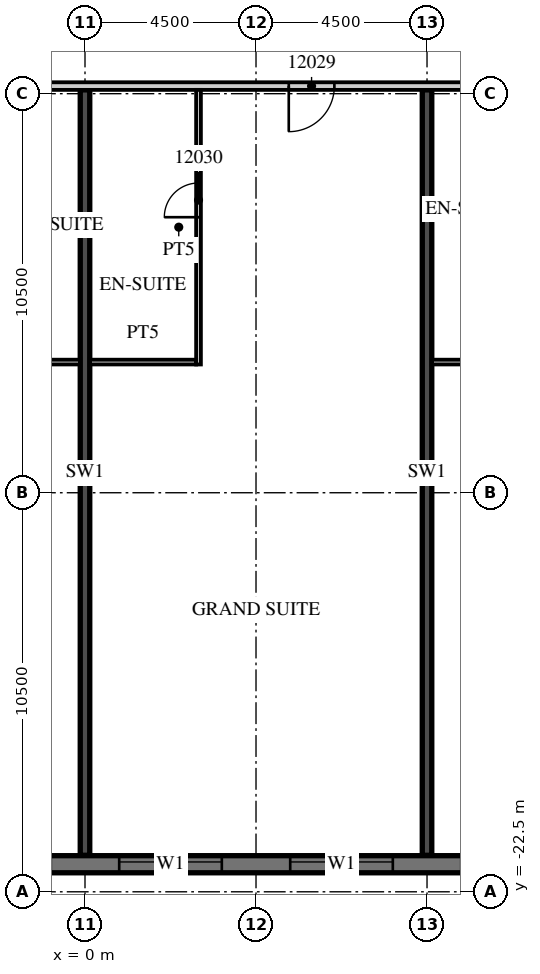
"""IFC4 building model, lengths in metres.
Left out: names, types, materials, properties, quantities, classifications, styles, units other than length and angle.
Written with IfcOpenShell. Run it as: python <this file> out.ifc"""

import sys

from ifc_helpers import new_model, si_unit, direction, frame, frame_2d, origin, place, context, subcontext, project, spatial, rectangle, extrude, element, fill, save


model = new_model("IFC4")
c1 = context("Model", 3, precision=1e-05, world=origin(), true_north=direction((0.0, 1.0)))
c2 = subcontext(c1, "Body", "Model", "MODEL_VIEW")
j1 = project(units=[si_unit("LENGTHUNIT", "METRE"), si_unit("PLANEANGLEUNIT", "RADIAN")], contexts=[c1])
p1 = place(None, origin())
s1 = spatial("IfcSite", under=j1, at=p1, CompositionType="ELEMENT")
p2 = place(p1, origin())
s2 = spatial("IfcBuilding", under=s1, at=p2, CompositionType="ELEMENT")
p3 = place(p2, frame((0.0, 0.0, 69.9)))
s3 = spatial("IfcBuildingStorey", under=s2, at=p3, CompositionType="ELEMENT", Elevation=69.9)
for number, where, z_axis, x_axis in (
    (1, (0.0, -21.54, 0.0), (0.0, 0.0, 1.0), (0.0, 1.0, 0.0)),
    (2, (9.0, -21.54, 0.0), (0.0, 0.0, 1.0), (0.0, 1.0, 0.0)),
):
    element("IfcWall", number, at=place(p3, frame(where, z_axis=z_axis, x_axis=x_axis)), inside=s3, PredefinedType="SHEAR", context=c2, shape_type="SweptSolid", body=[
        extrude(rectangle(XDim=20.14, YDim=0.25, at=frame_2d((10.07, 0.0))), origin(), (0.0, 0.0, 1.0), 3.3),
    ])
p4 = place(p3, frame((-13.5, -21.775, 0.0), z_axis=(0.0, 0.0, 1.0), x_axis=(1.0, 0.0, 0.0)))
e3 = element("IfcWall", 3, at=p4, inside=s3, PredefinedType="SOLIDWALL", context=c2, shape_type="SweptSolid", body=[
    extrude(rectangle(XDim=54.5, YDim=0.45, at=frame_2d((27.25, 0.0))), origin(), (0.0, 0.0, 1.0), 3.02),
])
p5 = place(p4, frame((0.9, 0.0, 0.45)))
e4 = element("IfcOpeningElement", 4, at=p5, cuts=e3, PredefinedType="OPENING", context=c2, shape_type="SweptSolid", body=[
    extrude(rectangle(XDim=2.7, YDim=2.25, at=frame_2d((1.35, 1.125))), frame((0.0, 0.235, 0.0), z_axis=(0.0, -1.0, 0.0), x_axis=(1.0, 0.0, 0.0)), (0.0, 0.0, 1.0), 0.47),
])
p6 = place(p4, frame((5.4, 0.0, 0.45)))
e5 = element("IfcOpeningElement", 5, at=p6, cuts=e3, PredefinedType="OPENING", context=c2, shape_type="SweptSolid", body=[
    extrude(rectangle(XDim=2.7, YDim=2.25, at=frame_2d((1.35, 1.125))), frame((0.0, 0.235, 0.0), z_axis=(0.0, -1.0, 0.0), x_axis=(1.0, 0.0, 0.0)), (0.0, 0.0, 1.0), 0.47),
])
p7 = place(p4, frame((9.9, 0.0, 0.45)))
e6 = element("IfcOpeningElement", 6, at=p7, cuts=e3, PredefinedType="OPENING", context=c2, shape_type="SweptSolid", body=[
    extrude(rectangle(XDim=2.7, YDim=2.25, at=frame_2d((1.35, 1.125))), frame((0.0, 0.235, 0.0), z_axis=(0.0, -1.0, 0.0), x_axis=(1.0, 0.0, 0.0)), (0.0, 0.0, 1.0), 0.47),
])
p8 = place(p4, frame((14.4, 0.0, 0.45)))
e7 = element("IfcOpeningElement", 7, at=p8, cuts=e3, PredefinedType="OPENING", context=c2, shape_type="SweptSolid", body=[
    extrude(rectangle(XDim=2.7, YDim=2.25, at=frame_2d((1.35, 1.125))), frame((0.0, 0.235, 0.0), z_axis=(0.0, -1.0, 0.0), x_axis=(1.0, 0.0, 0.0)), (0.0, 0.0, 1.0), 0.47),
])
p9 = place(p4, frame((18.9, 0.0, 0.45)))
e8 = element("IfcOpeningElement", 8, at=p9, cuts=e3, PredefinedType="OPENING", context=c2, shape_type="SweptSolid", body=[
    extrude(rectangle(XDim=2.7, YDim=2.25, at=frame_2d((1.35, 1.125))), frame((0.0, 0.235, 0.0), z_axis=(0.0, -1.0, 0.0), x_axis=(1.0, 0.0, 0.0)), (0.0, 0.0, 1.0), 0.47),
])
p10 = place(p4, frame((23.4, 0.0, 0.45)))
e9 = element("IfcOpeningElement", 9, at=p10, cuts=e3, PredefinedType="OPENING", context=c2, shape_type="SweptSolid", body=[
    extrude(rectangle(XDim=2.7, YDim=2.25, at=frame_2d((1.35, 1.125))), frame((0.0, 0.235, 0.0), z_axis=(0.0, -1.0, 0.0), x_axis=(1.0, 0.0, 0.0)), (0.0, 0.0, 1.0), 0.47),
])
p11 = place(p4, frame((27.9, 0.0, 0.45)))
e10 = element("IfcOpeningElement", 10, at=p11, cuts=e3, PredefinedType="OPENING", context=c2, shape_type="SweptSolid", body=[
    extrude(rectangle(XDim=2.7, YDim=2.25, at=frame_2d((1.35, 1.125))), frame((0.0, 0.235, 0.0), z_axis=(0.0, -1.0, 0.0), x_axis=(1.0, 0.0, 0.0)), (0.0, 0.0, 1.0), 0.47),
])
p12 = place(p4, frame((32.4, 0.0, 0.45)))
e11 = element("IfcOpeningElement", 11, at=p12, cuts=e3, PredefinedType="OPENING", context=c2, shape_type="SweptSolid", body=[
    extrude(rectangle(XDim=2.7, YDim=2.25, at=frame_2d((1.35, 1.125))), frame((0.0, 0.235, 0.0), z_axis=(0.0, -1.0, 0.0), x_axis=(1.0, 0.0, 0.0)), (0.0, 0.0, 1.0), 0.47),
])
p13 = place(p4, frame((36.9, 0.0, 0.45)))
e12 = element("IfcOpeningElement", 12, at=p13, cuts=e3, PredefinedType="OPENING", context=c2, shape_type="SweptSolid", body=[
    extrude(rectangle(XDim=2.7, YDim=2.25, at=frame_2d((1.35, 1.125))), frame((0.0, 0.235, 0.0), z_axis=(0.0, -1.0, 0.0), x_axis=(1.0, 0.0, 0.0)), (0.0, 0.0, 1.0), 0.47),
])
p14 = place(p4, frame((41.4, 0.0, 0.45)))
e13 = element("IfcOpeningElement", 13, at=p14, cuts=e3, PredefinedType="OPENING", context=c2, shape_type="SweptSolid", body=[
    extrude(rectangle(XDim=2.7, YDim=2.25, at=frame_2d((1.35, 1.125))), frame((0.0, 0.235, 0.0), z_axis=(0.0, -1.0, 0.0), x_axis=(1.0, 0.0, 0.0)), (0.0, 0.0, 1.0), 0.47),
])
p15 = place(p4, frame((45.9, 0.0, 0.45)))
e14 = element("IfcOpeningElement", 14, at=p15, cuts=e3, PredefinedType="OPENING", context=c2, shape_type="SweptSolid", body=[
    extrude(rectangle(XDim=2.7, YDim=2.25, at=frame_2d((1.35, 1.125))), frame((0.0, 0.235, 0.0), z_axis=(0.0, -1.0, 0.0), x_axis=(1.0, 0.0, 0.0)), (0.0, 0.0, 1.0), 0.47),
])
p16 = place(p4, frame((50.4, 0.0, 0.45)))
e15 = element("IfcOpeningElement", 15, at=p16, cuts=e3, PredefinedType="OPENING", context=c2, shape_type="SweptSolid", body=[
    extrude(rectangle(XDim=2.7, YDim=2.25, at=frame_2d((1.35, 1.125))), frame((0.0, 0.235, 0.0), z_axis=(0.0, -1.0, 0.0), x_axis=(1.0, 0.0, 0.0)), (0.0, 0.0, 1.0), 0.47),
])
p17 = place(p3, frame((-13.5, -1.3, 0.0), z_axis=(0.0, 0.0, 1.0), x_axis=(1.0, 0.0, 0.0)))
e16 = element("IfcWall", 16, at=p17, inside=s3, PredefinedType="PARTITIONING", context=c2, shape_type="SweptSolid", body=[
    extrude(rectangle(XDim=58.05, YDim=0.2, at=frame_2d((29.025, 0.0))), origin(), (0.0, 0.0, 1.0), 3.02),
])
p18 = place(p17, frame((2.925, 0.0, 0.0)))
e17 = element("IfcOpeningElement", 17, at=p18, cuts=e16, PredefinedType="OPENING", context=c2, shape_type="SweptSolid", body=[
    extrude(rectangle(XDim=1.0, YDim=2.1, at=frame_2d((0.5, 1.05))), frame((0.0, 0.11, 0.0), z_axis=(0.0, -1.0, 0.0), x_axis=(1.0, 0.0, 0.0)), (0.0, 0.0, 1.0), 0.22),
])
p19 = place(p17, frame((5.075, 0.0, 0.0)))
e18 = element("IfcOpeningElement", 18, at=p19, cuts=e16, PredefinedType="OPENING", context=c2, shape_type="SweptSolid", body=[
    extrude(rectangle(XDim=1.0, YDim=2.1, at=frame_2d((0.5, 1.05))), frame((0.0, 0.11, 0.0), z_axis=(0.0, -1.0, 0.0), x_axis=(1.0, 0.0, 0.0)), (0.0, 0.0, 1.0), 0.22),
])
p20 = place(p17, frame((9.55, 0.0, 0.0)))
e19 = element("IfcOpeningElement", 19, at=p20, cuts=e16, PredefinedType="OPENING", context=c2, shape_type="SweptSolid", body=[
    extrude(rectangle(XDim=1.0, YDim=2.1, at=frame_2d((0.5, 1.05))), frame((0.0, 0.11, 0.0), z_axis=(0.0, -1.0, 0.0), x_axis=(1.0, 0.0, 0.0)), (0.0, 0.0, 1.0), 0.22),
])
p21 = place(p17, frame((18.862, 0.0, 0.0)))
e20 = element("IfcOpeningElement", 20, at=p21, cuts=e16, PredefinedType="OPENING", context=c2, shape_type="SweptSolid", body=[
    extrude(rectangle(XDim=1.2, YDim=2.1, at=frame_2d((0.6, 1.05))), frame((0.0, 0.11, 0.0), z_axis=(0.0, -1.0, 0.0), x_axis=(1.0, 0.0, 0.0)), (0.0, 0.0, 1.0), 0.22),
])
p22 = place(p17, frame((27.862, 0.0, 0.0)))
e21 = element("IfcOpeningElement", 21, at=p22, cuts=e16, PredefinedType="OPENING", context=c2, shape_type="SweptSolid", body=[
    extrude(rectangle(XDim=1.2, YDim=2.1, at=frame_2d((0.6, 1.05))), frame((0.0, 0.11, 0.0), z_axis=(0.0, -1.0, 0.0), x_axis=(1.0, 0.0, 0.0)), (0.0, 0.0, 1.0), 0.22),
])
p23 = place(p17, frame((34.45, 0.0, 0.0)))
e22 = element("IfcOpeningElement", 22, at=p23, cuts=e16, PredefinedType="OPENING", context=c2, shape_type="SweptSolid", body=[
    extrude(rectangle(XDim=1.0, YDim=2.1, at=frame_2d((0.5, 1.05))), frame((0.0, 0.11, 0.0), z_axis=(0.0, -1.0, 0.0), x_axis=(1.0, 0.0, 0.0)), (0.0, 0.0, 1.0), 0.22),
])
p24 = place(p17, frame((38.925, 0.0, 0.0)))
e23 = element("IfcOpeningElement", 23, at=p24, cuts=e16, PredefinedType="OPENING", context=c2, shape_type="SweptSolid", body=[
    extrude(rectangle(XDim=1.0, YDim=2.1, at=frame_2d((0.5, 1.05))), frame((0.0, 0.11, 0.0), z_axis=(0.0, -1.0, 0.0), x_axis=(1.0, 0.0, 0.0)), (0.0, 0.0, 1.0), 0.22),
])
p25 = place(p17, frame((45.862, 0.0, 0.0)))
e24 = element("IfcOpeningElement", 24, at=p25, cuts=e16, PredefinedType="OPENING", context=c2, shape_type="SweptSolid", body=[
    extrude(rectangle(XDim=1.2, YDim=2.1, at=frame_2d((0.6, 1.05))), frame((0.0, 0.11, 0.0), z_axis=(0.0, -1.0, 0.0), x_axis=(1.0, 0.0, 0.0)), (0.0, 0.0, 1.0), 0.22),
])
p26 = place(p17, frame((50.075, 0.0, 0.0)))
e25 = element("IfcOpeningElement", 25, at=p26, cuts=e16, PredefinedType="OPENING", context=c2, shape_type="SweptSolid", body=[
    extrude(rectangle(XDim=1.0, YDim=2.1, at=frame_2d((0.5, 1.05))), frame((0.0, 0.11, 0.0), z_axis=(0.0, -1.0, 0.0), x_axis=(1.0, 0.0, 0.0)), (0.0, 0.0, 1.0), 0.22),
])
p27 = place(p17, frame((56.525, 0.0, 0.0)))
e26 = element("IfcOpeningElement", 26, at=p27, cuts=e16, PredefinedType="OPENING", context=c2, shape_type="SweptSolid", body=[
    extrude(rectangle(XDim=1.0, YDim=2.1, at=frame_2d((0.5, 1.05))), frame((0.0, 0.11, 0.0), z_axis=(0.0, -1.0, 0.0), x_axis=(1.0, 0.0, 0.0)), (0.0, 0.0, 1.0), 0.22),
])
p28 = place(p3, frame((-2.375, -8.562, 0.0), z_axis=(0.0, 0.0, 1.0), x_axis=(1.0, 0.0, 0.0)))
e27 = element("IfcWall", 27, at=p28, inside=s3, PredefinedType="PARTITIONING", context=c2, shape_type="SweptSolid", body=[
    extrude(rectangle(XDim=2.25, YDim=0.125, at=frame_2d((1.125, 0.0))), origin(), (0.0, 0.0, 1.0), 3.02),
])
p29 = place(p3, frame((2.987, -8.625, 0.0), z_axis=(0.0, 0.0, 1.0), x_axis=(0.0, 1.0, 0.0)))
e28 = element("IfcWall", 28, at=p29, inside=s3, PredefinedType="PARTITIONING", context=c2, shape_type="SweptSolid", body=[
    extrude(rectangle(XDim=7.225, YDim=0.125, at=frame_2d((3.613, 0.0))), origin(), (0.0, 0.0, 1.0), 3.02),
])
p30 = place(p29, frame((3.875, 0.0, 0.0)))
e29 = element("IfcOpeningElement", 29, at=p30, cuts=e28, PredefinedType="OPENING", context=c2, shape_type="SweptSolid", body=[
    extrude(rectangle(XDim=0.9, YDim=2.1, at=frame_2d((0.45, 1.05))), frame((0.0, 0.073, 0.0), z_axis=(0.0, -1.0, 0.0), x_axis=(1.0, 0.0, 0.0)), (0.0, 0.0, 1.0), 0.145),
])
for number, where, z_axis, x_axis in (
    (30, (0.125, -8.562, 0.0), (0.0, 0.0, 1.0), (1.0, 0.0, 0.0)),
    (31, (9.125, -8.562, 0.0), (0.0, 0.0, 1.0), (1.0, 0.0, 0.0)),
):
    element("IfcWall", number, at=place(p3, frame(where, z_axis=z_axis, x_axis=x_axis)), inside=s3, PredefinedType="PARTITIONING", context=c2, shape_type="SweptSolid", body=[
        extrude(rectangle(XDim=2.8, YDim=0.125, at=frame_2d((1.4, 0.0))), origin(), (0.0, 0.0, 1.0), 3.02),
    ])
p31 = place(p8, origin())
e32 = element("IfcWindow", 32, at=p31, inside=s3, PartitioningType="SINGLE_PANEL", PredefinedType="WINDOW", context=c2, shape_type="SweptSolid", body=[
    extrude(rectangle(XDim=2.7, YDim=2.25, at=frame_2d((1.35, 1.125))), frame((0.0, 0.09, 0.0), z_axis=(0.0, -1.0, 0.0), x_axis=(1.0, 0.0, 0.0)), (0.0, 0.0, 1.0), 0.06),
])
fill(e7, e32)
p32 = place(p9, origin())
e33 = element("IfcWindow", 33, at=p32, inside=s3, PartitioningType="SINGLE_PANEL", PredefinedType="WINDOW", context=c2, shape_type="SweptSolid", body=[
    extrude(rectangle(XDim=2.7, YDim=2.25, at=frame_2d((1.35, 1.125))), frame((0.0, 0.09, 0.0), z_axis=(0.0, -1.0, 0.0), x_axis=(1.0, 0.0, 0.0)), (0.0, 0.0, 1.0), 0.06),
])
fill(e8, e33)
p33 = place(p21, origin())
e34 = element("IfcDoor", 34, at=p33, inside=s3, OperationType="SINGLE_SWING_LEFT", PredefinedType="DOOR", context=c2, shape_type="SweptSolid", body=[
    extrude(rectangle(XDim=1.2, YDim=2.1, at=frame_2d((0.6, 1.05))), frame((0.0, 0.025, 0.0), z_axis=(0.0, -1.0, 0.0), x_axis=(1.0, 0.0, 0.0)), (0.0, 0.0, 1.0), 0.05),
])
fill(e20, e34)
p34 = place(p30, origin())
e35 = element("IfcDoor", 35, at=p34, inside=s3, OperationType="SINGLE_SWING_LEFT", PredefinedType="DOOR", context=c2, shape_type="SweptSolid", body=[
    extrude(rectangle(XDim=0.9, YDim=2.1, at=frame_2d((0.45, 1.05))), frame((0.0, 0.025, 0.0), z_axis=(0.0, -1.0, 0.0), x_axis=(1.0, 0.0, 0.0)), (0.0, 0.0, 1.0), 0.05),
])
fill(e29, e35)
save(model, sys.argv[1])
